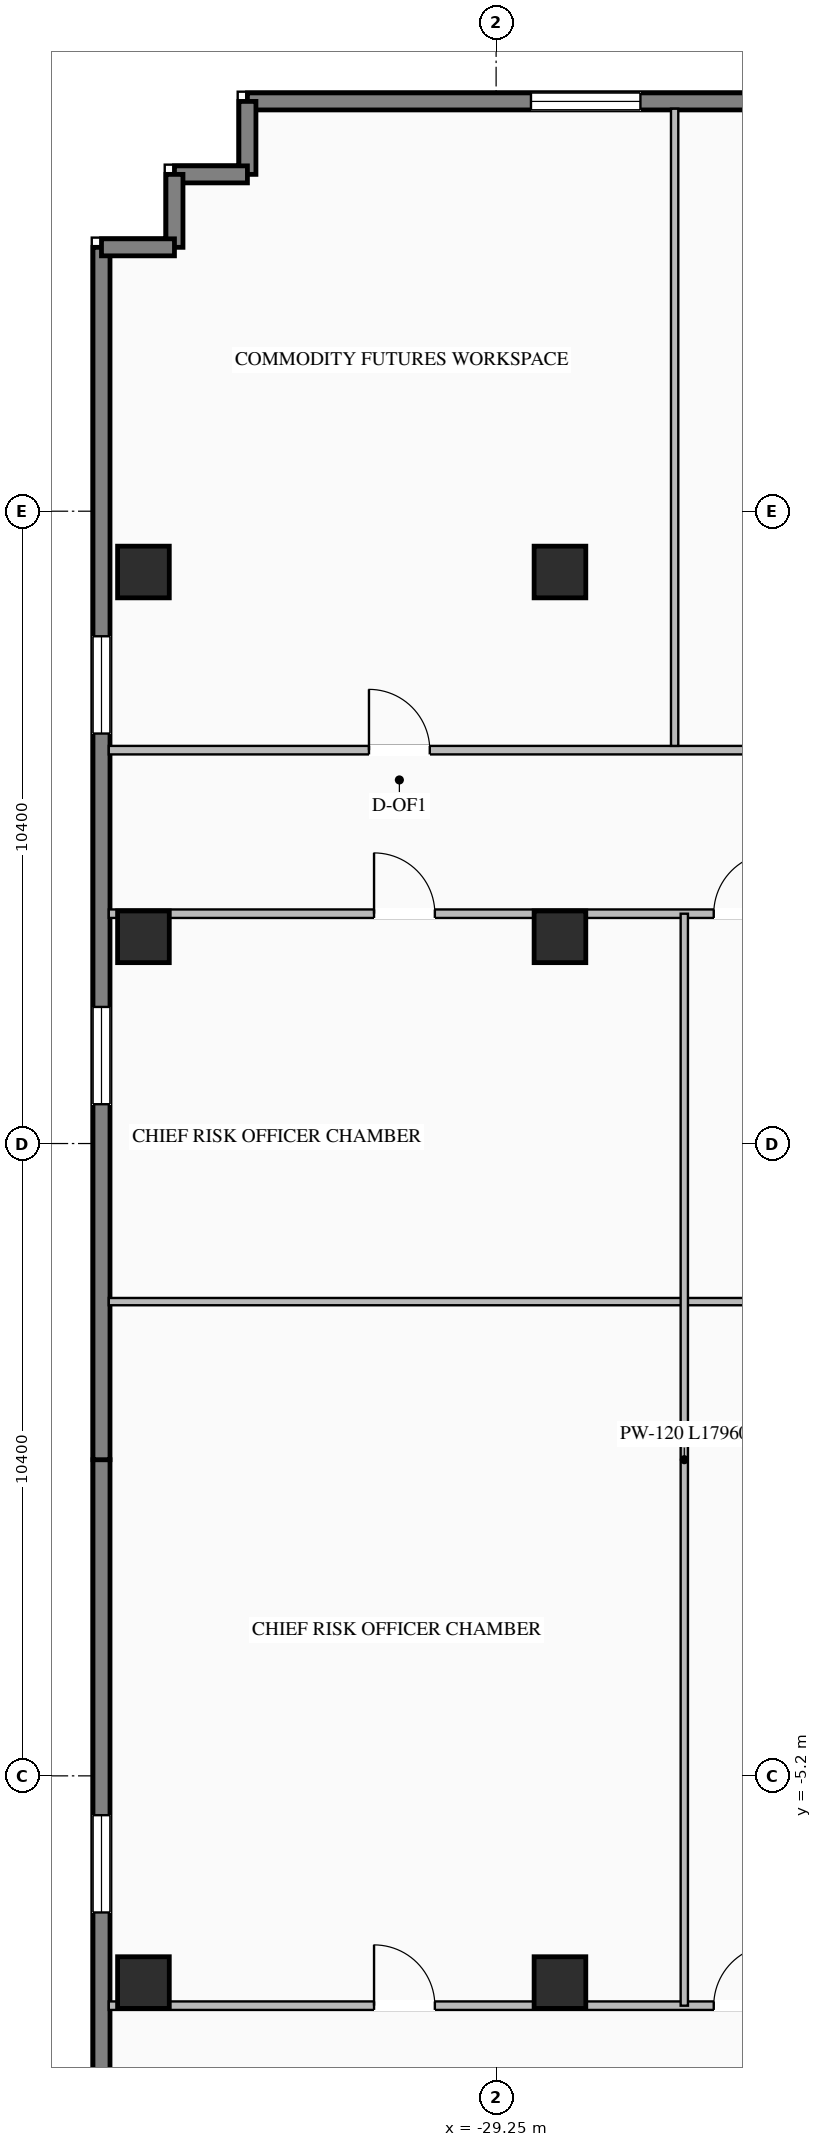
"""IFC4 building model, lengths in metres.
Left out: names, types, materials, properties, quantities, classifications, styles, units other than length and angle.
Written with IfcOpenShell. Run it as: python <this file> out.ifc"""

import sys

from ifc_helpers import new_model, si_unit, direction, frame, frame_2d, origin, origin_2d, place, context, subcontext, project, spatial, rectangle, i_section, extrude, element, fill, save


model = new_model("IFC4")
c1 = context("Model", 3, precision=1e-05, world=origin(), true_north=direction((0.0, 1.0)))
c2 = subcontext(c1, "Body", "Model", "MODEL_VIEW")
j1 = project(units=[si_unit("LENGTHUNIT", "METRE"), si_unit("PLANEANGLEUNIT", "RADIAN")], contexts=[c1])
p1 = place(None, origin())
s1 = spatial("IfcSite", under=j1, at=p1, CompositionType="ELEMENT")
p2 = place(p1, origin())
s2 = spatial("IfcBuilding", under=s1, at=p2, CompositionType="ELEMENT")
p3 = place(p2, frame((0.0, 0.0, 58.8)))
s3 = spatial("IfcBuildingStorey", under=s2, at=p3, CompositionType="ELEMENT", Elevation=58.8)
for number, where, z_axis, x_axis in (
    (1, (-28.2, -8.6, 0.0), (0.0, 0.0, 1.0), (1.0, 0.0, 0.0)),
    (2, (-28.2, 8.6, 0.0), (0.0, 0.0, 1.0), (1.0, 0.0, 0.0)),
    (3, (-28.2, 14.6, 0.0), (0.0, 0.0, 1.0), (1.0, 0.0, 0.0)),
    (4, (-35.05, -8.6, 0.0), (0.0, 0.0, 1.0), (1.0, 0.0, 0.0)),
    (5, (-35.05, 8.6, 0.0), (0.0, 0.0, 1.0), (1.0, 0.0, 0.0)),
    (6, (-35.05, 14.6, 0.0), (0.0, 0.0, 1.0), (1.0, 0.0, 0.0)),
):
    element("IfcColumn", number, at=place(p3, frame(where, z_axis=z_axis, x_axis=x_axis)), inside=s3, PredefinedType="COLUMN", context=c2, shape_type="SweptSolid", body=[
        extrude(i_section(OverallWidth=0.85, OverallDepth=0.85, WebThickness=0.032, FlangeThickness=0.048, at=origin_2d()), origin(), (0.0, 0.0, 1.0), 3.45),
    ])
p4 = place(p3, frame((-33.34, 22.34, 0.0), z_axis=(0.0, 0.0, 1.0), x_axis=(1.0, 0.0, 0.0)))
e7 = element("IfcWall", 7, at=p4, inside=s3, PredefinedType="STANDARD", context=c2, shape_type="SweptSolid", body=[
    extrude(rectangle(XDim=19.84, YDim=0.28, at=frame_2d((9.92, 0.0))), origin(), (0.0, 0.0, 1.0), 3.25),
])
p5 = place(p4, frame((4.663, 0.0, 0.76)))
e8 = element("IfcOpeningElement", 8, at=p5, cuts=e7, PredefinedType="OPENING", context=c2, shape_type="SweptSolid", body=[
    extrude(rectangle(XDim=1.8, YDim=1.95, at=frame_2d((0.9, 0.975))), frame((0.0, 0.15, 0.0), z_axis=(0.0, -1.0, 0.0), x_axis=(1.0, 0.0, 0.0)), (0.0, 0.0, 1.0), 0.3),
])
p6 = place(p4, frame((12.327, 0.0, 0.76)))
e9 = element("IfcOpeningElement", 9, at=p6, cuts=e7, PredefinedType="OPENING", context=c2, shape_type="SweptSolid", body=[
    extrude(rectangle(XDim=1.8, YDim=1.95, at=frame_2d((0.9, 0.975))), frame((0.0, 0.15, 0.0), z_axis=(0.0, -1.0, 0.0), x_axis=(1.0, 0.0, 0.0)), (0.0, 0.0, 1.0), 0.3),
])
p7 = place(p3, frame((-35.74, -19.94, 0.0), z_axis=(0.0, 0.0, 1.0), x_axis=(0.0, 1.0, 0.0)))
e10 = element("IfcWall", 10, at=p7, inside=s3, PredefinedType="STANDARD", context=c2, shape_type="SweptSolid", body=[
    extrude(rectangle(XDim=19.94, YDim=0.28, at=frame_2d((9.97, 0.0))), origin(), (0.0, 0.0, 1.0), 3.25),
])
p8 = place(p7, frame((6.397, 0.0, 0.76)))
e11 = element("IfcOpeningElement", 11, at=p8, cuts=e10, PredefinedType="OPENING", context=c2, shape_type="SweptSolid", body=[
    extrude(rectangle(XDim=1.6, YDim=1.95, at=frame_2d((0.8, 0.975))), frame((0.0, 0.15, 0.0), z_axis=(0.0, -1.0, 0.0), x_axis=(1.0, 0.0, 0.0)), (0.0, 0.0, 1.0), 0.3),
])
p9 = place(p7, frame((12.493, 0.0, 0.76)))
e12 = element("IfcOpeningElement", 12, at=p9, cuts=e10, PredefinedType="OPENING", context=c2, shape_type="SweptSolid", body=[
    extrude(rectangle(XDim=1.6, YDim=1.95, at=frame_2d((0.8, 0.975))), frame((0.0, 0.15, 0.0), z_axis=(0.0, -1.0, 0.0), x_axis=(1.0, 0.0, 0.0)), (0.0, 0.0, 1.0), 0.3),
])
p10 = place(p3, frame((-35.74, 0.0, 0.0), z_axis=(0.0, 0.0, 1.0), x_axis=(0.0, 1.0, 0.0)))
e13 = element("IfcWall", 13, at=p10, inside=s3, PredefinedType="STANDARD", context=c2, shape_type="SweptSolid", body=[
    extrude(rectangle(XDim=19.94, YDim=0.28, at=frame_2d((9.97, 0.0))), origin(), (0.0, 0.0, 1.0), 3.25),
])
p11 = place(p10, frame((5.847, 0.0, 0.76)))
e14 = element("IfcOpeningElement", 14, at=p11, cuts=e13, PredefinedType="OPENING", context=c2, shape_type="SweptSolid", body=[
    extrude(rectangle(XDim=1.6, YDim=1.95, at=frame_2d((0.8, 0.975))), frame((0.0, 0.15, 0.0), z_axis=(0.0, -1.0, 0.0), x_axis=(1.0, 0.0, 0.0)), (0.0, 0.0, 1.0), 0.3),
])
p12 = place(p10, frame((11.943, 0.0, 0.76)))
e15 = element("IfcOpeningElement", 15, at=p12, cuts=e13, PredefinedType="OPENING", context=c2, shape_type="SweptSolid", body=[
    extrude(rectangle(XDim=1.6, YDim=1.95, at=frame_2d((0.8, 0.975))), frame((0.0, 0.15, 0.0), z_axis=(0.0, -1.0, 0.0), x_axis=(1.0, 0.0, 0.0)), (0.0, 0.0, 1.0), 0.3),
])
p13 = place(p3, frame((-33.34, 22.34, 0.0), z_axis=(0.0, 0.0, 1.0), x_axis=(0.0, -1.0, 0.0)))
e16 = element("IfcWall", 16, at=p13, inside=s3, PredefinedType="STANDARD", context=c2, shape_type="SweptSolid", body=[
    extrude(rectangle(XDim=1.2, YDim=0.28, at=frame_2d((0.6, 0.0))), origin(), (0.0, 0.0, 1.0), 3.25),
])
for number, where, z_axis, x_axis in (
    (17, (-33.34, 21.14, 0.0), (0.0, 0.0, 1.0), (-1.0, 0.0, 0.0)),
    (18, (-34.54, 21.14, 0.0), (0.0, 0.0, 1.0), (0.0, -1.0, 0.0)),
    (19, (-34.54, 19.94, 0.0), (0.0, 0.0, 1.0), (-1.0, 0.0, 0.0)),
):
    element("IfcWall", number, at=place(p3, frame(where, z_axis=z_axis, x_axis=x_axis)), inside=s3, PredefinedType="STANDARD", context=c2, shape_type="SweptSolid", body=[
        extrude(rectangle(XDim=1.2, YDim=0.28, at=frame_2d((0.6, 0.0))), origin(), (0.0, 0.0, 1.0), 3.25),
    ])
p14 = place(p3, frame((-35.62, 11.67, 0.0), z_axis=(0.0, 0.0, 1.0), x_axis=(1.0, 0.0, 0.0)))
e20 = element("IfcWall", 20, at=p14, inside=s3, PredefinedType="STANDARD", context=c2, shape_type="SweptSolid", body=[
    extrude(rectangle(XDim=71.24, YDim=0.14, at=frame_2d((35.62, 0.0))), origin(), (0.0, 0.0, 1.0), 3.25),
])
p15 = place(p14, frame((4.279, 0.0, 0.0)))
e21 = element("IfcOpeningElement", 21, at=p15, cuts=e20, PredefinedType="OPENING", context=c2, shape_type="SweptSolid", body=[
    extrude(rectangle(XDim=1.0, YDim=2.08, at=frame_2d((0.5, 1.04))), frame((0.0, 0.08, 0.0), z_axis=(0.0, -1.0, 0.0), x_axis=(1.0, 0.0, 0.0)), (0.0, 0.0, 1.0), 0.16),
])
p16 = place(p14, frame((13.784, 0.0, 0.0)))
e22 = element("IfcOpeningElement", 22, at=p16, cuts=e20, PredefinedType="OPENING", context=c2, shape_type="SweptSolid", body=[
    extrude(rectangle(XDim=1.0, YDim=2.08, at=frame_2d((0.5, 1.04))), frame((0.0, 0.08, 0.0), z_axis=(0.0, -1.0, 0.0), x_axis=(1.0, 0.0, 0.0)), (0.0, 0.0, 1.0), 0.16),
])
p17 = place(p14, frame((24.096, 0.0, 0.0)))
e23 = element("IfcOpeningElement", 23, at=p17, cuts=e20, PredefinedType="OPENING", context=c2, shape_type="SweptSolid", body=[
    extrude(rectangle(XDim=1.0, YDim=2.08, at=frame_2d((0.5, 1.04))), frame((0.0, 0.08, 0.0), z_axis=(0.0, -1.0, 0.0), x_axis=(1.0, 0.0, 0.0)), (0.0, 0.0, 1.0), 0.16),
])
p18 = place(p14, frame((34.764, 0.0, 0.0)))
e24 = element("IfcOpeningElement", 24, at=p18, cuts=e20, PredefinedType="OPENING", context=c2, shape_type="SweptSolid", body=[
    extrude(rectangle(XDim=1.0, YDim=2.08, at=frame_2d((0.5, 1.04))), frame((0.0, 0.08, 0.0), z_axis=(0.0, -1.0, 0.0), x_axis=(1.0, 0.0, 0.0)), (0.0, 0.0, 1.0), 0.16),
])
p19 = place(p14, frame((45.432, 0.0, 0.0)))
e25 = element("IfcOpeningElement", 25, at=p19, cuts=e20, PredefinedType="OPENING", context=c2, shape_type="SweptSolid", body=[
    extrude(rectangle(XDim=1.0, YDim=2.08, at=frame_2d((0.5, 1.04))), frame((0.0, 0.08, 0.0), z_axis=(0.0, -1.0, 0.0), x_axis=(1.0, 0.0, 0.0)), (0.0, 0.0, 1.0), 0.16),
])
p20 = place(p14, frame((55.744, 0.0, 0.0)))
e26 = element("IfcOpeningElement", 26, at=p20, cuts=e20, PredefinedType="OPENING", context=c2, shape_type="SweptSolid", body=[
    extrude(rectangle(XDim=1.0, YDim=2.08, at=frame_2d((0.5, 1.04))), frame((0.0, 0.08, 0.0), z_axis=(0.0, -1.0, 0.0), x_axis=(1.0, 0.0, 0.0)), (0.0, 0.0, 1.0), 0.16),
])
p21 = place(p14, frame((65.605, 0.0, 0.0)))
e27 = element("IfcOpeningElement", 27, at=p21, cuts=e20, PredefinedType="OPENING", context=c2, shape_type="SweptSolid", body=[
    extrude(rectangle(XDim=1.0, YDim=2.08, at=frame_2d((0.5, 1.04))), frame((0.0, 0.08, 0.0), z_axis=(0.0, -1.0, 0.0), x_axis=(1.0, 0.0, 0.0)), (0.0, 0.0, 1.0), 0.16),
])
p22 = place(p3, frame((-26.314, 11.74, 0.0), z_axis=(0.0, 0.0, 1.0), x_axis=(0.0, 1.0, 0.0)))
e28 = element("IfcWall", 28, at=p22, inside=s3, PredefinedType="STANDARD", context=c2, shape_type="SweptSolid", body=[
    extrude(rectangle(XDim=10.48, YDim=0.12, at=frame_2d((5.24, 0.0))), origin(), (0.0, 0.0, 1.0), 3.25),
])
p23 = place(p3, frame((-35.62, 8.98, 0.0), z_axis=(0.0, 0.0, 1.0), x_axis=(1.0, 0.0, 0.0)))
e29 = element("IfcWall", 29, at=p23, inside=s3, PredefinedType="STANDARD", context=c2, shape_type="SweptSolid", body=[
    extrude(rectangle(XDim=16.57, YDim=0.14, at=frame_2d((8.285, 0.0))), origin(), (0.0, 0.0, 1.0), 3.25),
])
p24 = place(p23, frame((4.363, 0.0, 0.0)))
e30 = element("IfcOpeningElement", 30, at=p24, cuts=e29, PredefinedType="OPENING", context=c2, shape_type="SweptSolid", body=[
    extrude(rectangle(XDim=1.0, YDim=2.08, at=frame_2d((0.5, 1.04))), frame((0.0, 0.08, 0.0), z_axis=(0.0, -1.0, 0.0), x_axis=(1.0, 0.0, 0.0)), (0.0, 0.0, 1.0), 0.16),
])
p25 = place(p23, frame((9.949, 0.0, 0.0)))
e31 = element("IfcOpeningElement", 31, at=p25, cuts=e29, PredefinedType="OPENING", context=c2, shape_type="SweptSolid", body=[
    extrude(rectangle(XDim=1.0, YDim=2.08, at=frame_2d((0.5, 1.04))), frame((0.0, 0.08, 0.0), z_axis=(0.0, -1.0, 0.0), x_axis=(1.0, 0.0, 0.0)), (0.0, 0.0, 1.0), 0.16),
])
p26 = place(p3, frame((-35.62, -8.98, 0.0), z_axis=(0.0, 0.0, 1.0), x_axis=(1.0, 0.0, 0.0)))
e32 = element("IfcWall", 32, at=p26, inside=s3, PredefinedType="STANDARD", context=c2, shape_type="SweptSolid", body=[
    extrude(rectangle(XDim=16.57, YDim=0.14, at=frame_2d((8.285, 0.0))), origin(), (0.0, 0.0, 1.0), 3.25),
])
p27 = place(p26, frame((4.363, 0.0, 0.0)))
e33 = element("IfcOpeningElement", 33, at=p27, cuts=e32, PredefinedType="OPENING", context=c2, shape_type="SweptSolid", body=[
    extrude(rectangle(XDim=1.0, YDim=2.08, at=frame_2d((0.5, 1.04))), frame((0.0, 0.08, 0.0), z_axis=(0.0, -1.0, 0.0), x_axis=(1.0, 0.0, 0.0)), (0.0, 0.0, 1.0), 0.16),
])
p28 = place(p26, frame((9.949, 0.0, 0.0)))
e34 = element("IfcOpeningElement", 34, at=p28, cuts=e32, PredefinedType="OPENING", context=c2, shape_type="SweptSolid", body=[
    extrude(rectangle(XDim=1.0, YDim=2.08, at=frame_2d((0.5, 1.04))), frame((0.0, 0.08, 0.0), z_axis=(0.0, -1.0, 0.0), x_axis=(1.0, 0.0, 0.0)), (0.0, 0.0, 1.0), 0.16),
])
p29 = place(p3, frame((-35.62, 2.6, 0.0), z_axis=(0.0, 0.0, 1.0), x_axis=(1.0, 0.0, 0.0)))
e35 = element("IfcWall", 35, at=p29, inside=s3, PredefinedType="STANDARD", context=c2, shape_type="SweptSolid", body=[
    extrude(rectangle(XDim=16.57, YDim=0.12, at=frame_2d((8.285, 0.0))), origin(), (0.0, 0.0, 1.0), 3.25),
])
p30 = place(p3, frame((-26.155, -8.98, 0.0), z_axis=(0.0, 0.0, 1.0), x_axis=(0.0, 1.0, 0.0)))
e36 = element("IfcWall", 36, at=p30, inside=s3, PredefinedType="STANDARD", context=c2, shape_type="SweptSolid", body=[
    extrude(rectangle(XDim=17.96, YDim=0.12, at=frame_2d((8.98, 0.0))), origin(), (0.0, 0.0, 1.0), 3.25),
])
p31 = place(p5, origin())
e37 = element("IfcWindow", 37, at=p31, inside=s3, PartitioningType="SINGLE_PANEL", PredefinedType="WINDOW", context=c2, shape_type="SweptSolid", body=[
    extrude(rectangle(XDim=1.8, YDim=1.95, at=frame_2d((0.9, 0.975))), frame((0.0, 0.03, 0.0), z_axis=(0.0, -1.0, 0.0), x_axis=(1.0, 0.0, 0.0)), (0.0, 0.0, 1.0), 0.06),
])
fill(e8, e37)
p32 = place(p9, origin())
e38 = element("IfcWindow", 38, at=p32, inside=s3, PartitioningType="SINGLE_PANEL", PredefinedType="WINDOW", context=c2, shape_type="SweptSolid", body=[
    extrude(rectangle(XDim=1.6, YDim=1.95, at=frame_2d((0.8, 0.975))), frame((0.0, 0.03, 0.0), z_axis=(0.0, -1.0, 0.0), x_axis=(1.0, 0.0, 0.0)), (0.0, 0.0, 1.0), 0.06),
])
fill(e12, e38)
p33 = place(p11, origin())
e39 = element("IfcWindow", 39, at=p33, inside=s3, PartitioningType="SINGLE_PANEL", PredefinedType="WINDOW", context=c2, shape_type="SweptSolid", body=[
    extrude(rectangle(XDim=1.6, YDim=1.95, at=frame_2d((0.8, 0.975))), frame((0.0, 0.03, 0.0), z_axis=(0.0, -1.0, 0.0), x_axis=(1.0, 0.0, 0.0)), (0.0, 0.0, 1.0), 0.06),
])
fill(e14, e39)
p34 = place(p12, origin())
e40 = element("IfcWindow", 40, at=p34, inside=s3, PartitioningType="SINGLE_PANEL", PredefinedType="WINDOW", context=c2, shape_type="SweptSolid", body=[
    extrude(rectangle(XDim=1.6, YDim=1.95, at=frame_2d((0.8, 0.975))), frame((0.0, 0.03, 0.0), z_axis=(0.0, -1.0, 0.0), x_axis=(1.0, 0.0, 0.0)), (0.0, 0.0, 1.0), 0.06),
])
fill(e15, e40)
p35 = place(p15, origin())
e41 = element("IfcDoor", 41, at=p35, inside=s3, OperationType="SINGLE_SWING_LEFT", PredefinedType="DOOR", context=c2, shape_type="SweptSolid", body=[
    extrude(rectangle(XDim=1.0, YDim=2.08, at=frame_2d((0.5, 1.04))), frame((0.0, 0.025, 0.0), z_axis=(0.0, -1.0, 0.0), x_axis=(1.0, 0.0, 0.0)), (0.0, 0.0, 1.0), 0.05),
])
fill(e21, e41)
p36 = place(p24, origin())
e42 = element("IfcDoor", 42, at=p36, inside=s3, OperationType="SINGLE_SWING_LEFT", PredefinedType="DOOR", context=c2, shape_type="SweptSolid", body=[
    extrude(rectangle(XDim=1.0, YDim=2.08, at=frame_2d((0.5, 1.04))), frame((0.0, 0.025, 0.0), z_axis=(0.0, -1.0, 0.0), x_axis=(1.0, 0.0, 0.0)), (0.0, 0.0, 1.0), 0.05),
])
fill(e30, e42)
p37 = place(p25, origin())
e43 = element("IfcDoor", 43, at=p37, inside=s3, OperationType="SINGLE_SWING_RIGHT", PredefinedType="DOOR", context=c2, shape_type="SweptSolid", body=[
    extrude(rectangle(XDim=1.0, YDim=2.08, at=frame_2d((0.5, 1.04))), frame((0.0, 0.025, 0.0), z_axis=(0.0, -1.0, 0.0), x_axis=(1.0, 0.0, 0.0)), (0.0, 0.0, 1.0), 0.05),
])
fill(e31, e43)
p38 = place(p27, origin())
e44 = element("IfcDoor", 44, at=p38, inside=s3, OperationType="SINGLE_SWING_LEFT", PredefinedType="DOOR", context=c2, shape_type="SweptSolid", body=[
    extrude(rectangle(XDim=1.0, YDim=2.08, at=frame_2d((0.5, 1.04))), frame((0.0, 0.025, 0.0), z_axis=(0.0, -1.0, 0.0), x_axis=(1.0, 0.0, 0.0)), (0.0, 0.0, 1.0), 0.05),
])
fill(e33, e44)
p39 = place(p28, origin())
e45 = element("IfcDoor", 45, at=p39, inside=s3, OperationType="SINGLE_SWING_RIGHT", PredefinedType="DOOR", context=c2, shape_type="SweptSolid", body=[
    extrude(rectangle(XDim=1.0, YDim=2.08, at=frame_2d((0.5, 1.04))), frame((0.0, 0.025, 0.0), z_axis=(0.0, -1.0, 0.0), x_axis=(1.0, 0.0, 0.0)), (0.0, 0.0, 1.0), 0.05),
])
fill(e34, e45)
save(model, sys.argv[1])
